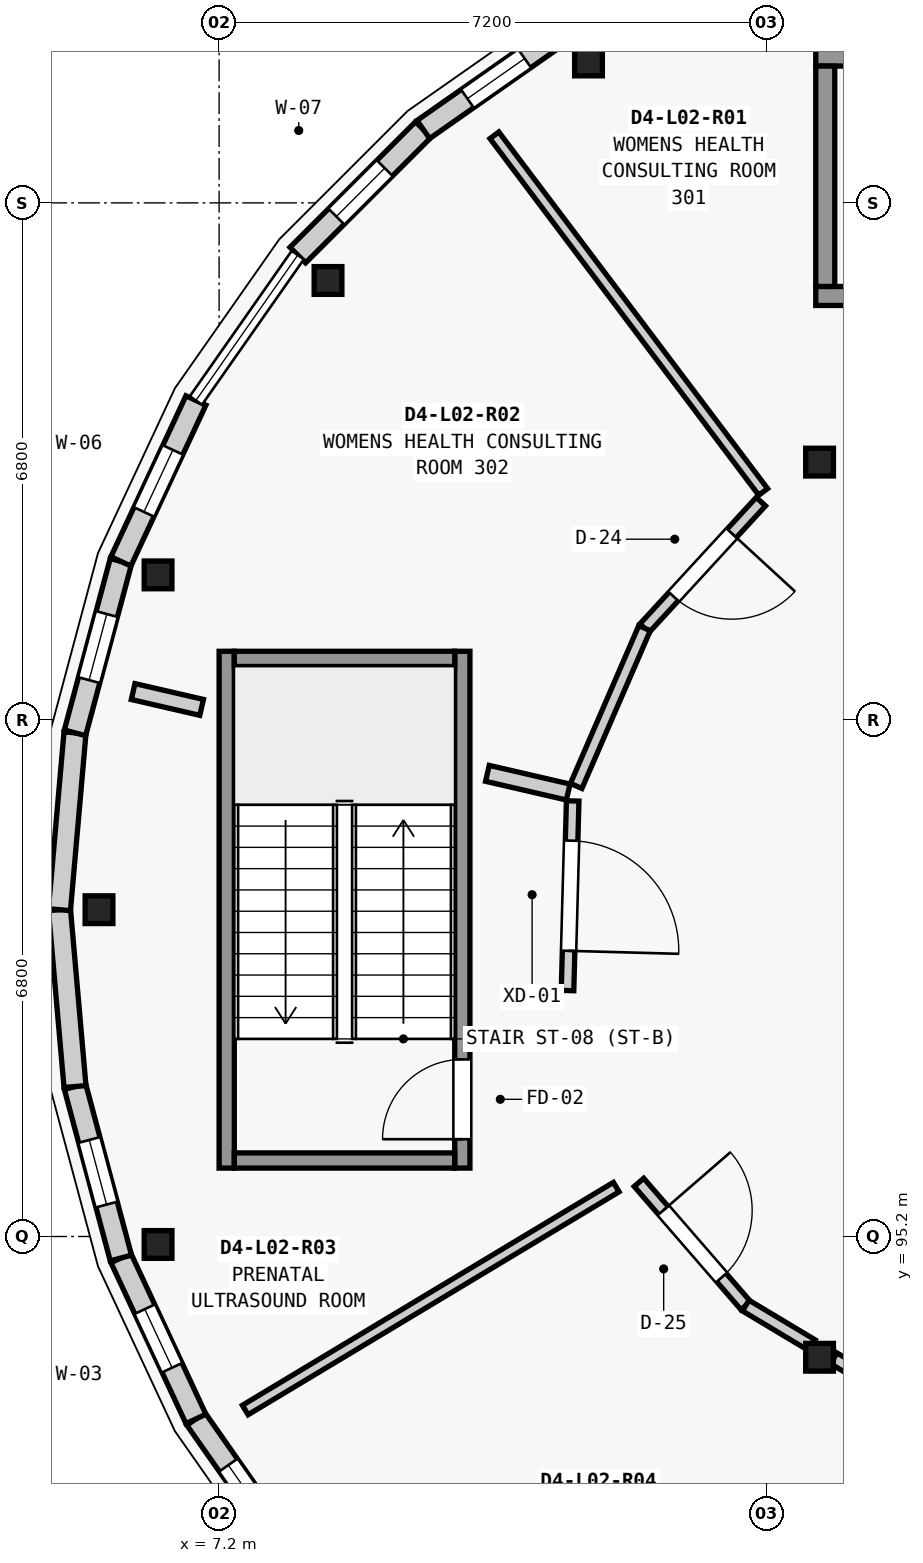
"""IFC4 building model, lengths in metres.
Left out: names, types, materials, properties, quantities, classifications, styles, units other than length and angle.
Written with IfcOpenShell. Run it as: python <this file> out.ifc"""

import sys

from ifc_helpers import new_model, si_unit, direction, frame, frame_2d, origin, origin_2d, place, context, subcontext, project, spatial, rectangle, extrude, element, fill, save


model = new_model("IFC4")
c1 = context("Model", 3, precision=1e-05, world=origin(), true_north=direction((0.0, 1.0)))
c2 = subcontext(c1, "Body", "Model", "MODEL_VIEW")
j1 = project(units=[si_unit("LENGTHUNIT", "METRE"), si_unit("PLANEANGLEUNIT", "RADIAN")], contexts=[c1])
p1 = place(None, origin())
s1 = spatial("IfcSite", under=j1, at=p1, CompositionType="ELEMENT")
p2 = place(p1, origin())
s2 = spatial("IfcBuilding", under=s1, at=p2, CompositionType="ELEMENT")
p3 = place(p2, frame((0.0, 0.0, 8.75)))
s3 = spatial("IfcBuildingStorey", under=s2, at=p3, CompositionType="ELEMENT", Elevation=8.75)
for number, where, z_axis, x_axis in (
    (1, (12.06, 110.654, 0.0), (0.0, 0.0, 1.0), (1.0, 0.0, 0.0)),
    (2, (8.633, 107.779, 0.0), (0.0, 0.0, 1.0), (1.0, 0.0, 0.0)),
    (3, (6.397, 103.905, 0.0), (0.0, 0.0, 1.0), (1.0, 0.0, 0.0)),
    (4, (5.62, 99.5, 0.0), (0.0, 0.0, 1.0), (1.0, 0.0, 0.0)),
    (5, (6.397, 95.095, 0.0), (0.0, 0.0, 1.0), (1.0, 0.0, 0.0)),
    (6, (15.1, 105.389, 0.0), (0.0, 0.0, 1.0), (1.0, 0.0, 0.0)),
    (7, (15.1, 93.611, 0.0), (0.0, 0.0, 1.0), (1.0, 0.0, 0.0)),
):
    element("IfcColumn", number, at=place(p3, frame(where, z_axis=z_axis, x_axis=x_axis)), inside=s3, PredefinedType="COLUMN", context=c2, shape_type="SweptSolid", body=[
        extrude(rectangle(XDim=0.365, YDim=0.365, at=origin_2d()), origin(), (0.0, 0.0, 1.0), 4.2),
    ])
p4 = place(p3, frame((8.235, 90.887, 0.0), z_axis=(0.0, 0.0, 1.0), x_axis=(-0.573728883722, 0.819045278347, 0.0)))
e8 = element("IfcWall", 8, at=p4, inside=s3, PredefinedType="ELEMENTEDWALL", context=c2, shape_type="SweptSolid", body=[
    extrude(rectangle(XDim=2.336, YDim=0.29, at=frame_2d((1.168, 0.0))), origin(), (0.0, 0.0, 1.0), 3.329),
])
p5 = place(p4, frame((0.743, 0.0, 0.85)))
e9 = element("IfcOpeningElement", 9, at=p5, cuts=e8, PredefinedType="OPENING", context=c2, shape_type="SweptSolid", body=[
    extrude(rectangle(XDim=0.85, YDim=1.5, at=frame_2d((0.425, 0.75))), frame((0.0, 0.155, 0.0), z_axis=(0.0, -1.0, 0.0), x_axis=(1.0, 0.0, 0.0)), (0.0, 0.0, 1.0), 0.31),
])
p6 = place(p3, frame((6.895, 92.8, 0.0), z_axis=(0.0, 0.0, 1.0), x_axis=(-0.422587894318, 0.906321946979, 0.0)))
e10 = element("IfcWall", 10, at=p6, inside=s3, PredefinedType="ELEMENTEDWALL", context=c2, shape_type="SweptSolid", body=[
    extrude(rectangle(XDim=2.336, YDim=0.29, at=frame_2d((1.168, 0.0))), origin(), (0.0, 0.0, 1.0), 3.329),
])
p7 = place(p6, frame((0.743, 0.0, 0.85)))
e11 = element("IfcOpeningElement", 11, at=p7, cuts=e10, PredefinedType="OPENING", context=c2, shape_type="SweptSolid", body=[
    extrude(rectangle(XDim=0.85, YDim=1.75, at=frame_2d((0.425, 0.875))), frame((0.0, 0.155, 0.0), z_axis=(0.0, -1.0, 0.0), x_axis=(1.0, 0.0, 0.0)), (0.0, 0.0, 1.0), 0.31),
])
p8 = place(p3, frame((5.908, 94.917, 0.0), z_axis=(0.0, 0.0, 1.0), x_axis=(-0.258612423585, 0.965981166673, 0.0)))
e12 = element("IfcWall", 12, at=p8, inside=s3, PredefinedType="ELEMENTEDWALL", context=c2, shape_type="SweptSolid", body=[
    extrude(rectangle(XDim=2.335, YDim=0.29, at=frame_2d((1.168, 0.0))), origin(), (0.0, 0.0, 1.0), 3.329),
])
p9 = place(p8, frame((0.728, 0.0, 0.85)))
e13 = element("IfcOpeningElement", 13, at=p9, cuts=e12, PredefinedType="OPENING", context=c2, shape_type="SweptSolid", body=[
    extrude(rectangle(XDim=0.88, YDim=1.6, at=frame_2d((0.44, 0.8))), frame((0.0, 0.155, 0.0), z_axis=(0.0, -1.0, 0.0), x_axis=(1.0, 0.0, 0.0)), (0.0, 0.0, 1.0), 0.31),
])
for number, where, z_axis, x_axis in (
    (14, (5.304, 97.173, 0.0), (0.0, 0.0, 1.0), (-0.087, 0.996, 0.0)),
    (15, (5.1, 99.5, 0.0), (0.0, 0.0, 1.0), (0.087, 0.996, 0.0)),
):
    element("IfcWall", number, at=place(p3, frame(where, z_axis=z_axis, x_axis=x_axis)), inside=s3, PredefinedType="ELEMENTEDWALL", context=c2, shape_type="SweptSolid", body=[
        extrude(rectangle(XDim=2.336, YDim=0.29, at=frame_2d((1.168, 0.0))), origin(), (0.0, 0.0, 1.0), 3.329),
    ])
p10 = place(p3, frame((5.304, 101.827, 0.0), z_axis=(0.0, 0.0, 1.0), x_axis=(0.258612423585, 0.965981166673, 0.0)))
e16 = element("IfcWall", 16, at=p10, inside=s3, PredefinedType="ELEMENTEDWALL", context=c2, shape_type="SweptSolid", body=[
    extrude(rectangle(XDim=2.335, YDim=0.29, at=frame_2d((1.168, 0.0))), origin(), (0.0, 0.0, 1.0), 3.329),
])
p11 = place(p10, frame((0.718, 0.0, 0.85)))
e17 = element("IfcOpeningElement", 17, at=p11, cuts=e16, PredefinedType="OPENING", context=c2, shape_type="SweptSolid", body=[
    extrude(rectangle(XDim=0.9, YDim=1.4, at=frame_2d((0.45, 0.7))), frame((0.0, 0.155, 0.0), z_axis=(0.0, -1.0, 0.0), x_axis=(1.0, 0.0, 0.0)), (0.0, 0.0, 1.0), 0.31),
])
p12 = place(p3, frame((5.908, 104.083, 0.0), z_axis=(0.0, 0.0, 1.0), x_axis=(0.422587894318, 0.906321946979, 0.0)))
e18 = element("IfcWall", 18, at=p12, inside=s3, PredefinedType="ELEMENTEDWALL", context=c2, shape_type="SweptSolid", body=[
    extrude(rectangle(XDim=2.336, YDim=0.29, at=frame_2d((1.168, 0.0))), origin(), (0.0, 0.0, 1.0), 3.329),
])
p13 = place(p12, frame((0.718, 0.0, 0.85)))
e19 = element("IfcOpeningElement", 19, at=p13, cuts=e18, PredefinedType="OPENING", context=c2, shape_type="SweptSolid", body=[
    extrude(rectangle(XDim=0.9, YDim=1.65, at=frame_2d((0.45, 0.825))), frame((0.0, 0.155, 0.0), z_axis=(0.0, -1.0, 0.0), x_axis=(1.0, 0.0, 0.0)), (0.0, 0.0, 1.0), 0.31),
])
p14 = place(p3, frame((8.235, 108.113, 0.0), z_axis=(0.0, 0.0, 1.0), x_axis=(0.707106781187, 0.707106781187, 0.0)))
e20 = element("IfcWall", 20, at=p14, inside=s3, PredefinedType="ELEMENTEDWALL", context=c2, shape_type="SweptSolid", body=[
    extrude(rectangle(XDim=2.336, YDim=0.29, at=frame_2d((1.168, 0.0))), origin(), (0.0, 0.0, 1.0), 3.329),
])
p15 = place(p14, frame((0.718, 0.0, 0.85)))
e21 = element("IfcOpeningElement", 21, at=p15, cuts=e20, PredefinedType="OPENING", context=c2, shape_type="SweptSolid", body=[
    extrude(rectangle(XDim=0.9, YDim=1.9, at=frame_2d((0.45, 0.95))), frame((0.0, 0.155, 0.0), z_axis=(0.0, -1.0, 0.0), x_axis=(1.0, 0.0, 0.0)), (0.0, 0.0, 1.0), 0.31),
])
p16 = place(p3, frame((9.887, 109.765, 0.0), z_axis=(0.0, 0.0, 1.0), x_axis=(0.819045278347, 0.573728883722, 0.0)))
e22 = element("IfcWall", 22, at=p16, inside=s3, PredefinedType="ELEMENTEDWALL", context=c2, shape_type="SweptSolid", body=[
    extrude(rectangle(XDim=2.336, YDim=0.29, at=frame_2d((1.168, 0.0))), origin(), (0.0, 0.0, 1.0), 3.329),
])
p17 = place(p16, frame((0.708, 0.0, 0.85)))
e23 = element("IfcOpeningElement", 23, at=p17, cuts=e22, PredefinedType="OPENING", context=c2, shape_type="SweptSolid", body=[
    extrude(rectangle(XDim=0.92, YDim=1.55, at=frame_2d((0.46, 0.775))), frame((0.0, 0.155, 0.0), z_axis=(0.0, -1.0, 0.0), x_axis=(1.0, 0.0, 0.0)), (0.0, 0.0, 1.0), 0.31),
])
p18 = place(p3, frame((15.05, 107.575, 0.0), z_axis=(0.0, 0.0, 1.0), x_axis=(1.0, 0.0, 0.0)))
e24 = element("IfcWall", 24, at=p18, inside=s3, PredefinedType="SHEAR", context=c2, shape_type="SweptSolid", body=[
    extrude(rectangle(XDim=6.9, YDim=0.25, at=frame_2d((3.45, 0.0))), origin(), (0.0, 0.0, 1.0), 3.975),
])
p19 = place(p18, frame((0.43, 0.0, 0.0)))
e25 = element("IfcOpeningElement", 25, at=p19, cuts=e24, PredefinedType="OPENING", context=c2, shape_type="SweptSolid", body=[
    extrude(rectangle(XDim=1.1, YDim=2.15, at=frame_2d((0.55, 1.075))), frame((0.0, 0.135, 0.0), z_axis=(0.0, -1.0, 0.0), x_axis=(1.0, 0.0, 0.0)), (0.0, 0.0, 1.0), 0.27),
])
p20 = place(p3, frame((15.05, 110.725, 0.0), z_axis=(0.0, 0.0, 1.0), x_axis=(1.0, 0.0, 0.0)))
e26 = element("IfcWall", 26, at=p20, inside=s3, PredefinedType="SHEAR", context=c2, shape_type="SweptSolid", body=[
    extrude(rectangle(XDim=6.9, YDim=0.25, at=frame_2d((3.45, 0.0))), origin(), (0.0, 0.0, 1.0), 3.975),
])
p21 = place(p3, frame((15.175, 107.7, 0.0), z_axis=(0.0, 0.0, 1.0), x_axis=(0.0, 1.0, 0.0)))
e27 = element("IfcWall", 27, at=p21, inside=s3, PredefinedType="SHEAR", context=c2, shape_type="SweptSolid", body=[
    extrude(rectangle(XDim=2.9, YDim=0.25, at=frame_2d((1.45, 0.0))), origin(), (0.0, 0.0, 1.0), 3.975),
])
p22 = place(p3, frame((10.4, 96.1, 0.0), z_axis=(0.0, 0.0, 1.0), x_axis=(0.0, 1.0, 0.0)))
e28 = element("IfcWall", 28, at=p22, inside=s3, PredefinedType="SHEAR", context=c2, shape_type="SweptSolid", body=[
    extrude(rectangle(XDim=6.8, YDim=0.2, at=frame_2d((3.4, 0.0))), origin(), (0.0, 0.0, 1.0), 3.975),
])
p23 = place(p22, frame((0.38, 0.0, 0.0)))
e29 = element("IfcOpeningElement", 29, at=p23, cuts=e28, PredefinedType="OPENING", context=c2, shape_type="SweptSolid", body=[
    extrude(rectangle(XDim=1.05, YDim=2.15, at=frame_2d((0.525, 1.075))), frame((0.0, 0.11, 0.0), z_axis=(0.0, -1.0, 0.0), x_axis=(1.0, 0.0, 0.0)), (0.0, 0.0, 1.0), 0.22),
])
p24 = place(p3, frame((7.3, 96.1, 0.0), z_axis=(0.0, 0.0, 1.0), x_axis=(0.0, 1.0, 0.0)))
e30 = element("IfcWall", 30, at=p24, inside=s3, PredefinedType="SHEAR", context=c2, shape_type="SweptSolid", body=[
    extrude(rectangle(XDim=6.8, YDim=0.2, at=frame_2d((3.4, 0.0))), origin(), (0.0, 0.0, 1.0), 3.975),
])
for number, where, z_axis, x_axis in (
    (31, (10.3, 96.2, 0.0), (0.0, 0.0, 1.0), (-1.0, 0.0, 0.0)),
    (32, (10.3, 102.8, 0.0), (0.0, 0.0, 1.0), (-1.0, 0.0, 0.0)),
):
    element("IfcWall", number, at=place(p3, frame(where, z_axis=z_axis, x_axis=x_axis)), inside=s3, PredefinedType="SHEAR", context=c2, shape_type="SweptSolid", body=[
        extrude(rectangle(XDim=2.9, YDim=0.2, at=frame_2d((1.45, 0.0))), origin(), (0.0, 0.0, 1.0), 3.975),
    ])
p25 = place(p3, frame((14.358, 104.997, 0.0), z_axis=(0.0, 0.0, 1.0), x_axis=(-0.601846782462, 0.798611576701, 0.0)))
e33 = element("IfcWall", 33, at=p25, inside=s3, PredefinedType="PARTITIONING", context=c2, shape_type="SweptSolid", body=[
    extrude(rectangle(XDim=5.875, YDim=0.145, at=frame_2d((2.938, 0.0))), origin(), (0.0, 0.0, 1.0), 3.304),
])
p26 = place(p3, frame((11.793, 101.048, 0.0), z_axis=(0.0, 0.0, 1.0), x_axis=(-0.974281711151, 0.225333413672, 0.0)))
e34 = element("IfcWall", 34, at=p26, inside=s3, PredefinedType="SOLIDWALL", context=c2, shape_type="SweptSolid", body=[
    extrude(rectangle(XDim=1.091, YDim=0.215, at=frame_2d((0.545, 0.0))), origin(), (0.0, 0.0, 1.0), 3.304),
])
p27 = place(p3, frame((6.97, 102.162, 0.0), z_axis=(0.0, 0.0, 1.0), x_axis=(-0.974364486591, 0.22497521479, 0.0)))
e35 = element("IfcWall", 35, at=p27, inside=s3, PredefinedType="SOLIDWALL", context=c2, shape_type="SweptSolid", body=[
    extrude(rectangle(XDim=0.925, YDim=0.215, at=frame_2d((0.462, 0.0))), origin(), (0.0, 0.0, 1.0), 3.304),
])
p28 = place(p3, frame((12.425, 95.85, 0.0), z_axis=(0.0, 0.0, 1.0), x_axis=(-0.857148493381, -0.515069374255, 0.0)))
e36 = element("IfcWall", 36, at=p28, inside=s3, PredefinedType="PARTITIONING", context=c2, shape_type="SweptSolid", body=[
    extrude(rectangle(XDim=5.695, YDim=0.145, at=frame_2d((2.847, 0.0))), origin(), (0.0, 0.0, 1.0), 3.304),
])
p29 = place(p3, frame((16.033, 93.074, 0.0), z_axis=(0.0, 0.0, 1.0), x_axis=(-0.35829933208, -0.933606763381, 0.0)))
e37 = element("IfcWall", 37, at=p29, inside=s3, PredefinedType="PARTITIONING", context=c2, shape_type="SweptSolid", body=[
    extrude(rectangle(XDim=5.897, YDim=0.145, at=frame_2d((2.949, 0.0))), origin(), (0.0, 0.0, 1.0), 3.304),
])
p30 = place(p3, frame((14.328, 104.869, 0.0), z_axis=(0.0, 0.0, 1.0), x_axis=(-0.676853044356, -0.736118167379, 0.0)))
e38 = element("IfcWall", 38, at=p30, inside=s3, PredefinedType="PARTITIONING", context=c2, shape_type="SweptSolid", body=[
    extrude(rectangle(XDim=2.261, YDim=0.165, at=frame_2d((1.131, 0.0))), origin(), (0.0, 0.0, 1.0), 3.304),
])
p31 = place(p30, frame((0.566, 0.0, 0.0)))
e39 = element("IfcOpeningElement", 39, at=p31, cuts=e38, PredefinedType="OPENING", context=c2, shape_type="SweptSolid", body=[
    extrude(rectangle(XDim=1.13, YDim=2.14, at=frame_2d((0.565, 1.07))), frame((0.0, 0.093, 0.0), z_axis=(0.0, -1.0, 0.0), x_axis=(1.0, 0.0, 0.0)), (0.0, 0.0, 1.0), 0.185),
])
p32 = place(p3, frame((12.797, 103.204, 0.0), z_axis=(0.0, 0.0, 1.0), x_axis=(-0.397419678039, -0.917636964985, 0.0)))
e40 = element("IfcWall", 40, at=p32, inside=s3, PredefinedType="PARTITIONING", context=c2, shape_type="SweptSolid", body=[
    extrude(rectangle(XDim=2.262, YDim=0.165, at=frame_2d((1.131, 0.0))), origin(), (0.0, 0.0, 1.0), 3.304),
])
p33 = place(p3, frame((11.852, 100.931, 0.0), z_axis=(0.0, 0.0, 1.0), x_axis=(-0.027291914499, -0.999627506326, 0.0)))
e41 = element("IfcWall", 41, at=p33, inside=s3, PredefinedType="PARTITIONING", context=c2, shape_type="SweptSolid", body=[
    extrude(rectangle(XDim=2.496, YDim=0.165, at=frame_2d((1.248, 0.0))), origin(), (0.0, 0.0, 1.0), 3.304),
])
p34 = place(p33, frame((0.523, 0.0, 0.0)))
e42 = element("IfcOpeningElement", 42, at=p34, cuts=e41, PredefinedType="OPENING", context=c2, shape_type="SweptSolid", body=[
    extrude(rectangle(XDim=1.45, YDim=2.28, at=frame_2d((0.725, 1.14))), frame((0.0, 0.093, 0.0), z_axis=(0.0, -1.0, 0.0), x_axis=(1.0, 0.0, 0.0)), (0.0, 0.0, 1.0), 0.185),
])
p35 = place(p3, frame((12.724, 95.912, 0.0), z_axis=(0.0, 0.0, 1.0), x_axis=(0.654887207042, -0.755726634473, 0.0)))
e43 = element("IfcWall", 43, at=p35, inside=s3, PredefinedType="PARTITIONING", context=c2, shape_type="SweptSolid", body=[
    extrude(rectangle(XDim=2.145, YDim=0.165, at=frame_2d((1.073, 0.0))), origin(), (0.0, 0.0, 1.0), 3.304),
])
p36 = place(p35, frame((0.488, 0.0, 0.0)))
e44 = element("IfcOpeningElement", 44, at=p36, cuts=e43, PredefinedType="OPENING", context=c2, shape_type="SweptSolid", body=[
    extrude(rectangle(XDim=1.17, YDim=2.24, at=frame_2d((0.585, 1.12))), frame((0.0, 0.093, 0.0), z_axis=(0.0, -1.0, 0.0), x_axis=(1.0, 0.0, 0.0)), (0.0, 0.0, 1.0), 0.185),
])
p37 = place(p3, frame((14.129, 94.291, 0.0), z_axis=(0.0, 0.0, 1.0), x_axis=(0.857789762301, -0.51400070398, 0.0)))
e45 = element("IfcWall", 45, at=p37, inside=s3, PredefinedType="PARTITIONING", context=c2, shape_type="SweptSolid", body=[
    extrude(rectangle(XDim=1.016, YDim=0.165, at=frame_2d((0.508, 0.0))), origin(), (0.0, 0.0, 1.0), 3.304),
])
p38 = place(p3, frame((15.287, 93.597, 0.0), z_axis=(0.0, 0.0, 1.0), x_axis=(0.858142882263, -0.513410940301, 0.0)))
e46 = element("IfcWall", 46, at=p38, inside=s3, PredefinedType="PARTITIONING", context=c2, shape_type="SweptSolid", body=[
    extrude(rectangle(XDim=0.795, YDim=0.165, at=frame_2d((0.397, 0.0))), origin(), (0.0, 0.0, 1.0), 3.304),
])
p39 = place(p5, origin())
e47 = element("IfcWindow", 47, at=p39, inside=s3, PartitioningType="SINGLE_PANEL", PredefinedType="WINDOW", context=c2, shape_type="SweptSolid", body=[
    extrude(rectangle(XDim=0.85, YDim=1.5, at=frame_2d((0.425, 0.75))), frame((0.0, 0.03, 0.0), z_axis=(0.0, -1.0, 0.0), x_axis=(1.0, 0.0, 0.0)), (0.0, 0.0, 1.0), 0.06),
])
fill(e9, e47)
p40 = place(p7, origin())
e48 = element("IfcWindow", 48, at=p40, inside=s3, PartitioningType="SINGLE_PANEL", PredefinedType="WINDOW", context=c2, shape_type="SweptSolid", body=[
    extrude(rectangle(XDim=0.85, YDim=1.75, at=frame_2d((0.425, 0.875))), frame((0.0, 0.03, 0.0), z_axis=(0.0, -1.0, 0.0), x_axis=(1.0, 0.0, 0.0)), (0.0, 0.0, 1.0), 0.06),
])
fill(e11, e48)
p41 = place(p9, origin())
e49 = element("IfcWindow", 49, at=p41, inside=s3, PartitioningType="SINGLE_PANEL", PredefinedType="WINDOW", context=c2, shape_type="SweptSolid", body=[
    extrude(rectangle(XDim=0.88, YDim=1.6, at=frame_2d((0.44, 0.8))), frame((0.0, 0.03, 0.0), z_axis=(0.0, -1.0, 0.0), x_axis=(1.0, 0.0, 0.0)), (0.0, 0.0, 1.0), 0.06),
])
fill(e13, e49)
p42 = place(p11, origin())
e50 = element("IfcWindow", 50, at=p42, inside=s3, PartitioningType="SINGLE_PANEL", PredefinedType="WINDOW", context=c2, shape_type="SweptSolid", body=[
    extrude(rectangle(XDim=0.9, YDim=1.4, at=frame_2d((0.45, 0.7))), frame((0.0, 0.03, 0.0), z_axis=(0.0, -1.0, 0.0), x_axis=(1.0, 0.0, 0.0)), (0.0, 0.0, 1.0), 0.06),
])
fill(e17, e50)
p43 = place(p13, origin())
e51 = element("IfcWindow", 51, at=p43, inside=s3, PartitioningType="SINGLE_PANEL", PredefinedType="WINDOW", context=c2, shape_type="SweptSolid", body=[
    extrude(rectangle(XDim=0.9, YDim=1.65, at=frame_2d((0.45, 0.825))), frame((0.0, 0.03, 0.0), z_axis=(0.0, -1.0, 0.0), x_axis=(1.0, 0.0, 0.0)), (0.0, 0.0, 1.0), 0.06),
])
fill(e19, e51)
p44 = place(p15, origin())
e52 = element("IfcWindow", 52, at=p44, inside=s3, PartitioningType="SINGLE_PANEL", PredefinedType="WINDOW", context=c2, shape_type="SweptSolid", body=[
    extrude(rectangle(XDim=0.9, YDim=1.9, at=frame_2d((0.45, 0.95))), frame((0.0, 0.03, 0.0), z_axis=(0.0, -1.0, 0.0), x_axis=(1.0, 0.0, 0.0)), (0.0, 0.0, 1.0), 0.06),
])
fill(e21, e52)
p45 = place(p17, origin())
e53 = element("IfcWindow", 53, at=p45, inside=s3, PartitioningType="SINGLE_PANEL", PredefinedType="WINDOW", context=c2, shape_type="SweptSolid", body=[
    extrude(rectangle(XDim=0.92, YDim=1.55, at=frame_2d((0.46, 0.775))), frame((0.0, 0.03, 0.0), z_axis=(0.0, -1.0, 0.0), x_axis=(1.0, 0.0, 0.0)), (0.0, 0.0, 1.0), 0.06),
])
fill(e23, e53)
p46 = place(p23, origin())
e54 = element("IfcDoor", 54, at=p46, inside=s3, OperationType="SINGLE_SWING_LEFT", PredefinedType="DOOR", context=c2, shape_type="SweptSolid", body=[
    extrude(rectangle(XDim=1.05, YDim=2.15, at=frame_2d((0.525, 1.075))), frame((0.0, 0.025, 0.0), z_axis=(0.0, -1.0, 0.0), x_axis=(1.0, 0.0, 0.0)), (0.0, 0.0, 1.0), 0.05),
])
fill(e29, e54)
p47 = place(p31, origin())
e55 = element("IfcDoor", 55, at=p47, inside=s3, OperationType="SINGLE_SWING_LEFT", PredefinedType="DOOR", context=c2, shape_type="SweptSolid", body=[
    extrude(rectangle(XDim=1.13, YDim=2.14, at=frame_2d((0.565, 1.07))), frame((0.0, 0.025, 0.0), z_axis=(0.0, -1.0, 0.0), x_axis=(1.0, 0.0, 0.0)), (0.0, 0.0, 1.0), 0.05),
])
fill(e39, e55)
p48 = place(p34, origin())
e56 = element("IfcDoor", 56, at=p48, inside=s3, OperationType="SINGLE_SWING_RIGHT", PredefinedType="DOOR", context=c2, shape_type="SweptSolid", body=[
    extrude(rectangle(XDim=1.45, YDim=2.28, at=frame_2d((0.725, 1.14))), frame((0.0, 0.025, 0.0), z_axis=(0.0, -1.0, 0.0), x_axis=(1.0, 0.0, 0.0)), (0.0, 0.0, 1.0), 0.05),
])
fill(e42, e56)
p49 = place(p36, origin())
e57 = element("IfcDoor", 57, at=p49, inside=s3, OperationType="SINGLE_SWING_LEFT", PredefinedType="DOOR", context=c2, shape_type="SweptSolid", body=[
    extrude(rectangle(XDim=1.17, YDim=2.24, at=frame_2d((0.585, 1.12))), frame((0.0, 0.025, 0.0), z_axis=(0.0, -1.0, 0.0), x_axis=(1.0, 0.0, 0.0)), (0.0, 0.0, 1.0), 0.05),
])
fill(e44, e57)
save(model, sys.argv[1])
